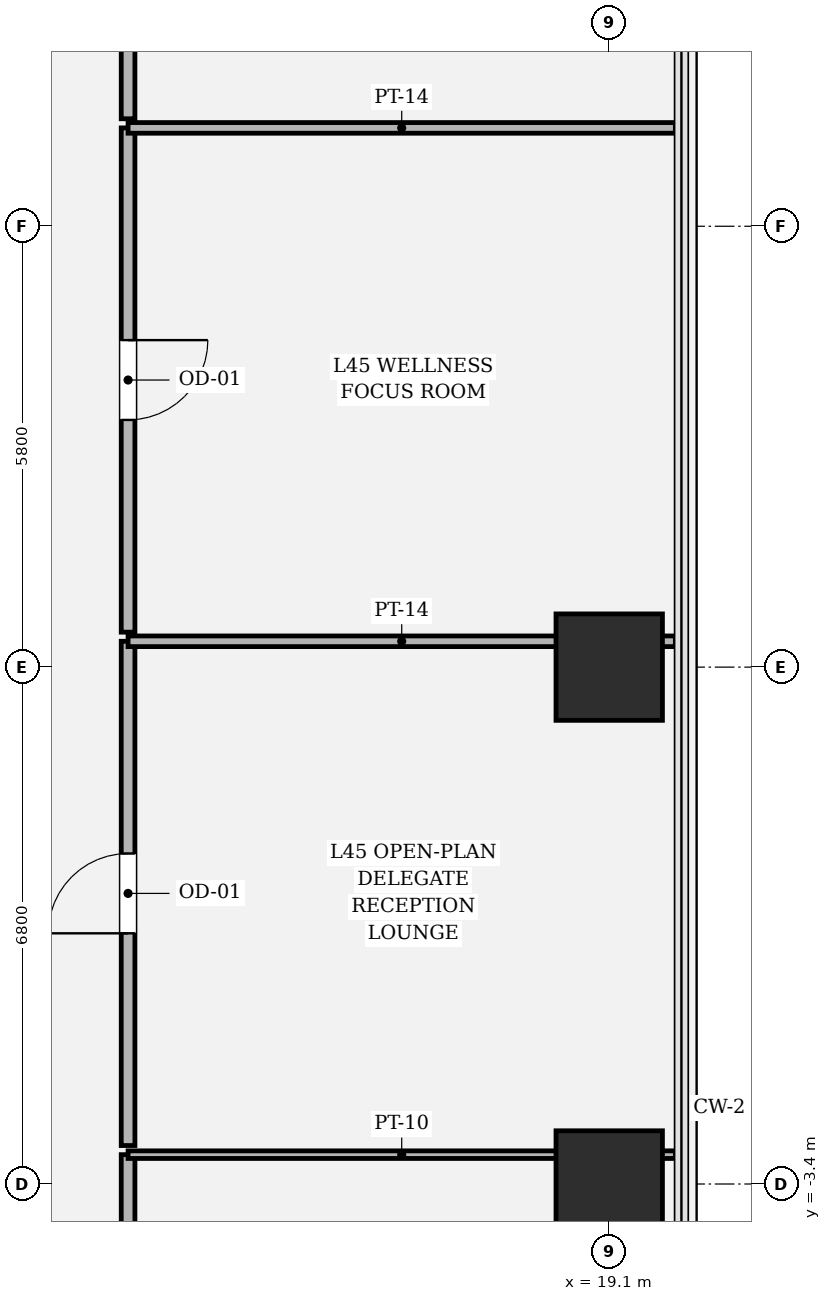
"""IFC4 building model, lengths in metres.
Left out: names, types, materials, properties, quantities, classifications, styles, units other than length and angle.
Written with IfcOpenShell. Run it as: python <this file> out.ifc"""

import sys

from ifc_helpers import new_model, si_unit, direction, frame, frame_2d, origin, origin_2d, place, context, subcontext, project, spatial, rectangle, hollow_rectangle, extrude, element, fill, save


model = new_model("IFC4")
c1 = context("Model", 3, precision=1e-05, world=origin(), true_north=direction((0.0, 1.0)))
c2 = subcontext(c1, "Body", "Model", "MODEL_VIEW")
j1 = project(units=[si_unit("LENGTHUNIT", "METRE"), si_unit("PLANEANGLEUNIT", "RADIAN")], contexts=[c1])
p1 = place(None, origin())
s1 = spatial("IfcSite", under=j1, at=p1, CompositionType="ELEMENT")
p2 = place(p1, origin())
s2 = spatial("IfcBuilding", under=s1, at=p2, CompositionType="ELEMENT")
p3 = place(p2, frame((0.0, 0.0, 192.45)))
s3 = spatial("IfcBuildingStorey", under=s2, at=p3, CompositionType="ELEMENT", Elevation=192.45)
for number, where, z_axis, x_axis in (
    (1, (19.1, -3.4, 0.0), (0.0, 0.0, 1.0), (1.0, 0.0, 0.0)),
    (2, (19.1, 3.4, 0.0), (0.0, 0.0, 1.0), (1.0, 0.0, 0.0)),
):
    element("IfcColumn", number, at=place(p3, frame(where, z_axis=z_axis, x_axis=x_axis)), inside=s3, PredefinedType="COLUMN", context=c2, shape_type="SweptSolid", body=[
        extrude(hollow_rectangle(XDim=1.4, YDim=1.4, WallThickness=0.042, at=origin_2d()), origin(), (0.0, 0.0, 1.0), 4.05),
    ])
p4 = place(p3, frame((12.77, -11.49, 0.0), z_axis=(0.0, 0.0, 1.0), x_axis=(0.0, 1.0, 0.0)))
e3 = element("IfcWall", 3, at=p4, inside=s3, PredefinedType="PARTITIONING", context=c2, shape_type="SweptSolid", body=[
    extrude(rectangle(XDim=8.476, YDim=0.18, at=frame_2d((4.238, 0.0))), origin(), (0.0, 0.0, 1.0), 3.174),
])
p5 = place(p4, frame((3.728, 0.0, 0.0)))
e4 = element("IfcOpeningElement", 4, at=p5, cuts=e3, PredefinedType="OPENING", context=c2, shape_type="SweptSolid", body=[
    extrude(rectangle(XDim=1.02, YDim=2.2, at=frame_2d((0.51, 1.1))), frame((0.0, 0.1, 0.0), z_axis=(0.0, -1.0, 0.0), x_axis=(1.0, 0.0, 0.0)), (0.0, 0.0, 1.0), 0.2),
])
p6 = place(p3, frame((12.77, -3.014, 0.0), z_axis=(0.0, 0.0, 1.0), x_axis=(1.0, 0.0, 0.0)))
e5 = element("IfcWall", 5, at=p6, inside=s3, PredefinedType="PARTITIONING", context=c2, shape_type="SweptSolid", body=[
    extrude(rectangle(XDim=7.2, YDim=0.1, at=frame_2d((3.6, 0.0))), origin(), (0.0, 0.0, 1.0), 3.174),
])
p7 = place(p3, frame((12.77, -2.894, 0.0), z_axis=(0.0, 0.0, 1.0), x_axis=(0.0, 1.0, 0.0)))
e6 = element("IfcWall", 6, at=p7, inside=s3, PredefinedType="PARTITIONING", context=c2, shape_type="SweptSolid", body=[
    extrude(rectangle(XDim=6.634, YDim=0.18, at=frame_2d((3.317, 0.0))), origin(), (0.0, 0.0, 1.0), 3.174),
])
p8 = place(p7, frame((2.792, 0.0, 0.0)))
e7 = element("IfcOpeningElement", 7, at=p8, cuts=e6, PredefinedType="OPENING", context=c2, shape_type="SweptSolid", body=[
    extrude(rectangle(XDim=1.05, YDim=2.2, at=frame_2d((0.525, 1.1))), frame((0.0, 0.1, 0.0), z_axis=(0.0, -1.0, 0.0), x_axis=(1.0, 0.0, 0.0)), (0.0, 0.0, 1.0), 0.2),
])
p9 = place(p3, frame((12.77, 3.74, 0.0), z_axis=(0.0, 0.0, 1.0), x_axis=(1.0, 0.0, 0.0)))
e8 = element("IfcWall", 8, at=p9, inside=s3, PredefinedType="PARTITIONING", context=c2, shape_type="SweptSolid", body=[
    extrude(rectangle(XDim=7.2, YDim=0.14, at=frame_2d((3.6, 0.0))), origin(), (0.0, 0.0, 1.0), 3.174),
])
p10 = place(p3, frame((12.77, 3.86, 0.0), z_axis=(0.0, 0.0, 1.0), x_axis=(0.0, 1.0, 0.0)))
e9 = element("IfcWall", 9, at=p10, inside=s3, PredefinedType="PARTITIONING", context=c2, shape_type="SweptSolid", body=[
    extrude(rectangle(XDim=6.634, YDim=0.18, at=frame_2d((3.317, 0.0))), origin(), (0.0, 0.0, 1.0), 3.174),
])
p11 = place(p10, frame((2.792, 0.0, 0.0)))
e10 = element("IfcOpeningElement", 10, at=p11, cuts=e9, PredefinedType="OPENING", context=c2, shape_type="SweptSolid", body=[
    extrude(rectangle(XDim=1.05, YDim=2.2, at=frame_2d((0.525, 1.1))), frame((0.0, 0.1, 0.0), z_axis=(0.0, -1.0, 0.0), x_axis=(1.0, 0.0, 0.0)), (0.0, 0.0, 1.0), 0.2),
])
p12 = place(p3, frame((12.77, 10.494, 0.0), z_axis=(0.0, 0.0, 1.0), x_axis=(1.0, 0.0, 0.0)))
e11 = element("IfcWall", 11, at=p12, inside=s3, PredefinedType="PARTITIONING", context=c2, shape_type="SweptSolid", body=[
    extrude(rectangle(XDim=7.2, YDim=0.14, at=frame_2d((3.6, 0.0))), origin(), (0.0, 0.0, 1.0), 3.174),
])
p13 = place(p3, frame((12.77, 10.614, 0.0), z_axis=(0.0, 0.0, 1.0), x_axis=(0.0, 1.0, 0.0)))
e12 = element("IfcWall", 12, at=p13, inside=s3, PredefinedType="PARTITIONING", context=c2, shape_type="SweptSolid", body=[
    extrude(rectangle(XDim=7.756, YDim=0.18, at=frame_2d((3.878, 0.0))), origin(), (0.0, 0.0, 1.0), 3.174),
])
p14 = place(p13, frame((3.368, 0.0, 0.0)))
e13 = element("IfcOpeningElement", 13, at=p14, cuts=e12, PredefinedType="OPENING", context=c2, shape_type="SweptSolid", body=[
    extrude(rectangle(XDim=1.02, YDim=2.2, at=frame_2d((0.51, 1.1))), frame((0.0, 0.1, 0.0), z_axis=(0.0, -1.0, 0.0), x_axis=(1.0, 0.0, 0.0)), (0.0, 0.0, 1.0), 0.2),
])
p15 = place(p8, origin())
e14 = element("IfcDoor", 14, at=p15, inside=s3, OperationType="SINGLE_SWING_LEFT", PredefinedType="DOOR", context=c2, shape_type="SweptSolid", body=[
    extrude(rectangle(XDim=1.05, YDim=2.2, at=frame_2d((0.525, 1.1))), frame((0.0, 0.025, 0.0), z_axis=(0.0, -1.0, 0.0), x_axis=(1.0, 0.0, 0.0)), (0.0, 0.0, 1.0), 0.05),
])
fill(e7, e14)
p16 = place(p11, origin())
e15 = element("IfcDoor", 15, at=p16, inside=s3, OperationType="SINGLE_SWING_RIGHT", PredefinedType="DOOR", context=c2, shape_type="SweptSolid", body=[
    extrude(rectangle(XDim=1.05, YDim=2.2, at=frame_2d((0.525, 1.1))), frame((0.0, 0.025, 0.0), z_axis=(0.0, -1.0, 0.0), x_axis=(1.0, 0.0, 0.0)), (0.0, 0.0, 1.0), 0.05),
])
fill(e10, e15)
save(model, sys.argv[1])
